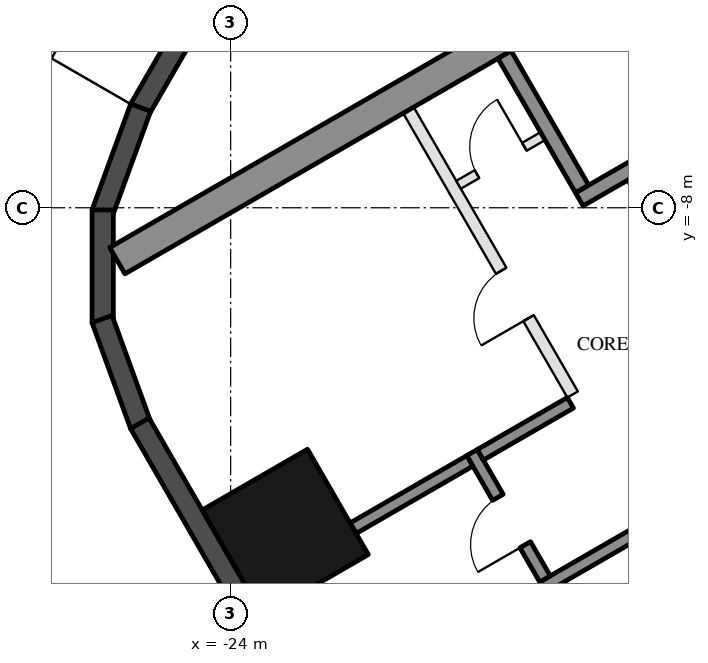
"""IFC4 building model, lengths in metres.
Left out: names, types, materials, properties, quantities, classifications, styles, units other than length and angle.
Written with IfcOpenShell. Run it as: python <this file> out.ifc"""

import sys

from ifc_helpers import new_model, si_unit, direction, frame, frame_2d, origin, origin_2d, place, context, subcontext, project, spatial, rectangle, hollow_rectangle, extrude, boolean, halfspace, element, fill, save


model = new_model("IFC4")
c1 = context("Model", 3, precision=1e-05, world=origin(), true_north=direction((0.0, 1.0)))
c2 = subcontext(c1, "Body", "Model", "MODEL_VIEW")
j1 = project(units=[si_unit("LENGTHUNIT", "METRE"), si_unit("PLANEANGLEUNIT", "RADIAN")], contexts=[c1])
p1 = place(None, origin())
s1 = spatial("IfcSite", under=j1, at=p1, CompositionType="ELEMENT")
p2 = place(p1, origin())
s2 = spatial("IfcBuilding", under=s1, at=p2, CompositionType="ELEMENT")
p3 = place(p2, frame((0.0, 0.0, 261.5)))
s3 = spatial("IfcBuildingStorey", under=s2, at=p3, CompositionType="ELEMENT", Elevation=261.5)
p4 = place(p3, frame((-23.102, -13.338, 0.0), z_axis=(0.0, 0.0, 1.0), x_axis=(-0.5, 0.866025403784, 0.0)))
e1 = element("IfcColumn", 1, at=p4, inside=s3, PredefinedType="COLUMN", context=c2, shape_type="SweptSolid", body=[
    boolean("DIFFERENCE", extrude(hollow_rectangle(XDim=2.0, YDim=2.0, WallThickness=0.05, at=origin_2d()), origin(), (0.0, 0.0, 1.0), 3.7), halfspace(frame((0.0, 0.0, 3.587), z_axis=(0.0, 0.0, 1.0), x_axis=(1.0, 0.0, 0.0)), False)),
])
p5 = place(p3, frame((-23.579, -3.065, 0.0), z_axis=(0.0, 0.0, 1.0), x_axis=(-0.500048109927, -0.865997625723, 0.0)))
e2 = element("IfcWall", 2, at=p5, inside=s3, PredefinedType="SOLIDWALL", context=c2, shape_type="SweptSolid", body=[
    extrude(rectangle(XDim=3.829, YDim=0.35, at=frame_2d((1.914, 0.0))), origin(), (0.0, 0.0, 1.0), 3.55),
])
p6 = place(p5, frame((1.575, 0.0, 0.3)))
e3 = element("IfcOpeningElement", 3, at=p6, cuts=e2, PredefinedType="OPENING", context=c2, shape_type="SweptSolid", body=[
    extrude(rectangle(XDim=0.8, YDim=2.65, at=frame_2d((0.4, 1.325))), frame((0.0, 0.185, 0.0), z_axis=(0.0, -1.0, 0.0), x_axis=(1.0, 0.0, 0.0)), (0.0, 0.0, 1.0), 0.37),
])
for number, where, z_axis, x_axis in (
    (4, (-25.481, -6.353, 0.0), (0.0, 0.0, 1.0), (-0.342, -0.94, 0.0)),
    (5, (-26.104, -8.036, 0.0), (0.0, 0.0, 1.0), (0.0, -1.0, 0.0)),
):
    element("IfcWall", number, at=place(p3, frame(where, z_axis=z_axis, x_axis=x_axis)), inside=s3, PredefinedType="SOLIDWALL", context=c2, shape_type="SweptSolid", body=[
        extrude(rectangle(XDim=1.855, YDim=0.35, at=frame_2d((0.927, 0.0))), origin(), (0.0, 0.0, 1.0), 3.55),
    ])
p7 = place(p3, frame((-26.115, -9.831, 0.0), z_axis=(0.0, 0.0, 1.0), x_axis=(0.341890986265, -0.93973962006, 0.0)))
e6 = element("IfcWall", 6, at=p7, inside=s3, PredefinedType="SOLIDWALL", context=c2, shape_type="SweptSolid", body=[
    extrude(rectangle(XDim=1.855, YDim=0.35, at=frame_2d((0.928, 0.0))), origin(), (0.0, 0.0, 1.0), 3.55),
])
p8 = place(p3, frame((-25.494, -11.546, 0.0), z_axis=(0.0, 0.0, 1.0), x_axis=(0.500028854569, -0.86600874395, 0.0)))
e7 = element("IfcWall", 7, at=p8, inside=s3, PredefinedType="SOLIDWALL", context=c2, shape_type="SweptSolid", body=[
    extrude(rectangle(XDim=5.495, YDim=0.35, at=frame_2d((2.748, 0.0))), origin(), (0.0, 0.0, 1.0), 3.55),
])
for number, where, z_axis, x_axis in (
    (8, (-13.797, -1.903, 0.0), (0.0, 0.0, 1.0), (-0.866, -0.5, 0.0)),
    (9, (-8.547, -10.997, 0.0), (0.0, 0.0, 1.0), (-0.866, -0.5, 0.0)),
):
    element("IfcWall", number, at=place(p3, frame(where, z_axis=z_axis, x_axis=x_axis)), inside=s3, PredefinedType="SHEAR", context=c2, shape_type="SweptSolid", body=[
        extrude(rectangle(XDim=13.934, YDim=0.5, at=frame_2d((6.967, 0.0))), origin(), (0.0, 0.0, 1.0), 3.5),
    ])
p9 = place(p3, frame((-12.681, -4.636, 0.0), z_axis=(0.0, 0.0, 1.0), x_axis=(-0.866021702275, -0.500006411147, 0.0)))
e10 = element("IfcWall", 10, at=p9, inside=s3, PredefinedType="SHEAR", context=c2, shape_type="SweptSolid", body=[
    extrude(rectangle(XDim=6.45, YDim=0.25, at=frame_2d((3.225, 0.0))), origin(), (0.0, 0.0, 1.0), 3.5),
])
p10 = place(p9, frame((0.3, 0.0, 0.0)))
e11 = element("IfcOpeningElement", 11, at=p10, cuts=e10, PredefinedType="OPENING", context=c2, shape_type="SweptSolid", body=[
    extrude(rectangle(XDim=1.0, YDim=2.1, at=frame_2d((0.5, 1.05))), frame((0.0, 0.135, 0.0), z_axis=(0.0, -1.0, 0.0), x_axis=(1.0, 0.0, 0.0)), (0.0, 0.0, 1.0), 0.27),
])
p11 = place(p3, frame((-19.496, -5.482, 0.0), z_axis=(0.0, 0.0, 1.0), x_axis=(0.499990435942, -0.866030925526, 0.0)))
e12 = element("IfcWall", 12, at=p11, inside=s3, PredefinedType="SHEAR", context=c2, shape_type="SweptSolid", body=[
    extrude(rectangle(XDim=2.55, YDim=0.25, at=frame_2d((1.275, 0.0))), origin(), (0.0, 0.0, 1.0), 3.5),
])
p12 = place(p3, frame((-17.381, -7.495, 0.0), z_axis=(0.0, 0.0, 1.0), x_axis=(0.500011755427, -0.866018616679, 0.0)))
e13 = element("IfcWall", 13, at=p12, inside=s3, PredefinedType="SHEAR", context=c2, shape_type="SweptSolid", body=[
    extrude(rectangle(XDim=2.8, YDim=0.2, at=frame_2d((1.4, 0.0))), origin(), (0.0, 0.0, 1.0), 3.5),
])
p13 = place(p3, frame((-10.068, -9.162, 0.0), z_axis=(0.0, 0.0, 1.0), x_axis=(-0.866032725843, -0.499987317609, 0.0)))
e14 = element("IfcWall", 14, at=p13, inside=s3, PredefinedType="SHEAR", context=c2, shape_type="SweptSolid", body=[
    extrude(rectangle(XDim=10.16, YDim=0.2, at=frame_2d((5.08, 0.0))), origin(), (0.0, 0.0, 1.0), 3.5),
])
p14 = place(p13, frame((4.53, 0.0, 0.0)))
e15 = element("IfcOpeningElement", 15, at=p14, cuts=e14, PredefinedType="OPENING", context=c2, shape_type="SweptSolid", body=[
    extrude(rectangle(XDim=0.9, YDim=2.1, at=frame_2d((0.45, 1.05))), frame((0.0, 0.11, 0.0), z_axis=(0.0, -1.0, 0.0), x_axis=(1.0, 0.0, 0.0)), (0.0, 0.0, 1.0), 0.22),
])
p15 = place(p3, frame((-20.031, -12.026, 0.0), z_axis=(0.0, 0.0, 1.0), x_axis=(0.500033551112, -0.866006032174, 0.0)))
e16 = element("IfcWall", 16, at=p15, inside=s3, PredefinedType="SHEAR", context=c2, shape_type="SweptSolid", body=[
    extrude(rectangle(XDim=2.4, YDim=0.2, at=frame_2d((1.2, 0.0))), origin(), (0.0, 0.0, 1.0), 3.5),
])
p16 = place(p15, frame((0.85, 0.0, 0.0)))
e17 = element("IfcOpeningElement", 17, at=p16, cuts=e16, PredefinedType="OPENING", context=c2, shape_type="SweptSolid", body=[
    extrude(rectangle(XDim=0.9, YDim=2.1, at=frame_2d((0.45, 1.05))), frame((0.0, 0.11, 0.0), z_axis=(0.0, -1.0, 0.0), x_axis=(1.0, 0.0, 0.0)), (0.0, 0.0, 1.0), 0.22),
])
p17 = place(p3, frame((-18.413, -11.208, 0.0), z_axis=(0.0, 0.0, 1.0), x_axis=(-0.866038183914, -0.499977863513, 0.0)))
e18 = element("IfcWall", 18, at=p17, inside=s3, PredefinedType="SHEAR", context=c2, shape_type="SweptSolid", body=[
    extrude(rectangle(XDim=1.71, YDim=0.2, at=frame_2d((0.855, 0.0))), origin(), (0.0, 0.0, 1.0), 3.5),
])
p18 = place(p3, frame((-20.067, -12.163, 0.0), z_axis=(0.0, 0.0, 1.0), x_axis=(-0.866079196458, -0.49990681678, 0.0)))
e19 = element("IfcWall", 19, at=p18, inside=s3, PredefinedType="SHEAR", context=c2, shape_type="SweptSolid", body=[
    extrude(rectangle(XDim=2.216, YDim=0.2, at=frame_2d((1.108, 0.0))), origin(), (0.0, 0.0, 1.0), 3.5),
])
p19 = place(p3, frame((-21.076, -6.395, 0.0), z_axis=(0.0, 0.0, 1.0), x_axis=(0.50001468107, -0.866016927499, 0.0)))
e20 = element("IfcWall", 20, at=p19, inside=s3, PredefinedType="PARTITIONING", context=c2, shape_type="SweptSolid", body=[
    extrude(rectangle(XDim=5.4, YDim=0.2, at=frame_2d((2.7, 0.0))), origin(), (0.0, 0.0, 1.0), 3.5),
])
p20 = place(p19, frame((3.05, 0.0, 0.0)))
e21 = element("IfcOpeningElement", 21, at=p20, cuts=e20, PredefinedType="OPENING", context=c2, shape_type="SweptSolid", body=[
    extrude(rectangle(XDim=0.9, YDim=2.1, at=frame_2d((0.45, 1.05))), frame((0.0, 0.11, 0.0), z_axis=(0.0, -1.0, 0.0), x_axis=(1.0, 0.0, 0.0)), (0.0, 0.0, 1.0), 0.22),
])
p21 = place(p3, frame((-18.866, -6.822, 0.0), z_axis=(0.0, 0.0, 1.0), x_axis=(-0.866028054938, -0.499995408039, 0.0)))
e22 = element("IfcWall", 22, at=p21, inside=s3, PredefinedType="PARTITIONING", context=c2, shape_type="SweptSolid", body=[
    extrude(rectangle(XDim=1.6, YDim=0.15, at=frame_2d((0.8, 0.0))), origin(), (0.0, 0.0, 1.0), 3.5),
])
p22 = place(p21, frame((0.35, 0.0, 0.0)))
e23 = element("IfcOpeningElement", 23, at=p22, cuts=e22, PredefinedType="OPENING", context=c2, shape_type="SweptSolid", body=[
    extrude(rectangle(XDim=0.9, YDim=2.1, at=frame_2d((0.45, 1.05))), frame((0.0, 0.085, 0.0), z_axis=(0.0, -1.0, 0.0), x_axis=(1.0, 0.0, 0.0)), (0.0, 0.0, 1.0), 0.17),
])
p23 = place(p22, frame((0.9, 0.0, 0.0), z_axis=(0.0, 0.0, 1.0), x_axis=(-1.0, 0.0, 0.0)))
e24 = element("IfcDoor", 24, at=p23, inside=s3, OperationType="SINGLE_SWING_RIGHT", PredefinedType="DOOR", context=c2, shape_type="SweptSolid", body=[
    extrude(rectangle(XDim=0.9, YDim=2.1, at=frame_2d((0.45, 1.05))), frame((0.0, 0.025, 0.0), z_axis=(0.0, -1.0, 0.0), x_axis=(1.0, 0.0, 0.0)), (0.0, 0.0, 1.0), 0.05),
])
fill(e23, e24)
p24 = place(p16, frame((0.9, 0.0, 0.0), z_axis=(0.0, 0.0, 1.0), x_axis=(-1.0, 0.0, 0.0)))
e25 = element("IfcDoor", 25, at=p24, inside=s3, OperationType="SINGLE_SWING_LEFT", PredefinedType="DOOR", context=c2, shape_type="SweptSolid", body=[
    extrude(rectangle(XDim=0.9, YDim=2.1, at=frame_2d((0.45, 1.05))), frame((0.0, 0.025, 0.0), z_axis=(0.0, -1.0, 0.0), x_axis=(1.0, 0.0, 0.0)), (0.0, 0.0, 1.0), 0.05),
])
fill(e17, e25)
p25 = place(p20, frame((0.9, 0.0, 0.0), z_axis=(0.0, 0.0, 1.0), x_axis=(-1.0, 0.0, 0.0)))
e26 = element("IfcDoor", 26, at=p25, inside=s3, OperationType="SINGLE_SWING_LEFT", PredefinedType="DOOR", context=c2, shape_type="SweptSolid", body=[
    extrude(rectangle(XDim=0.9, YDim=2.1, at=frame_2d((0.45, 1.05))), frame((0.0, 0.025, 0.0), z_axis=(0.0, -1.0, 0.0), x_axis=(1.0, 0.0, 0.0)), (0.0, 0.0, 1.0), 0.05),
])
fill(e21, e26)
save(model, sys.argv[1])
